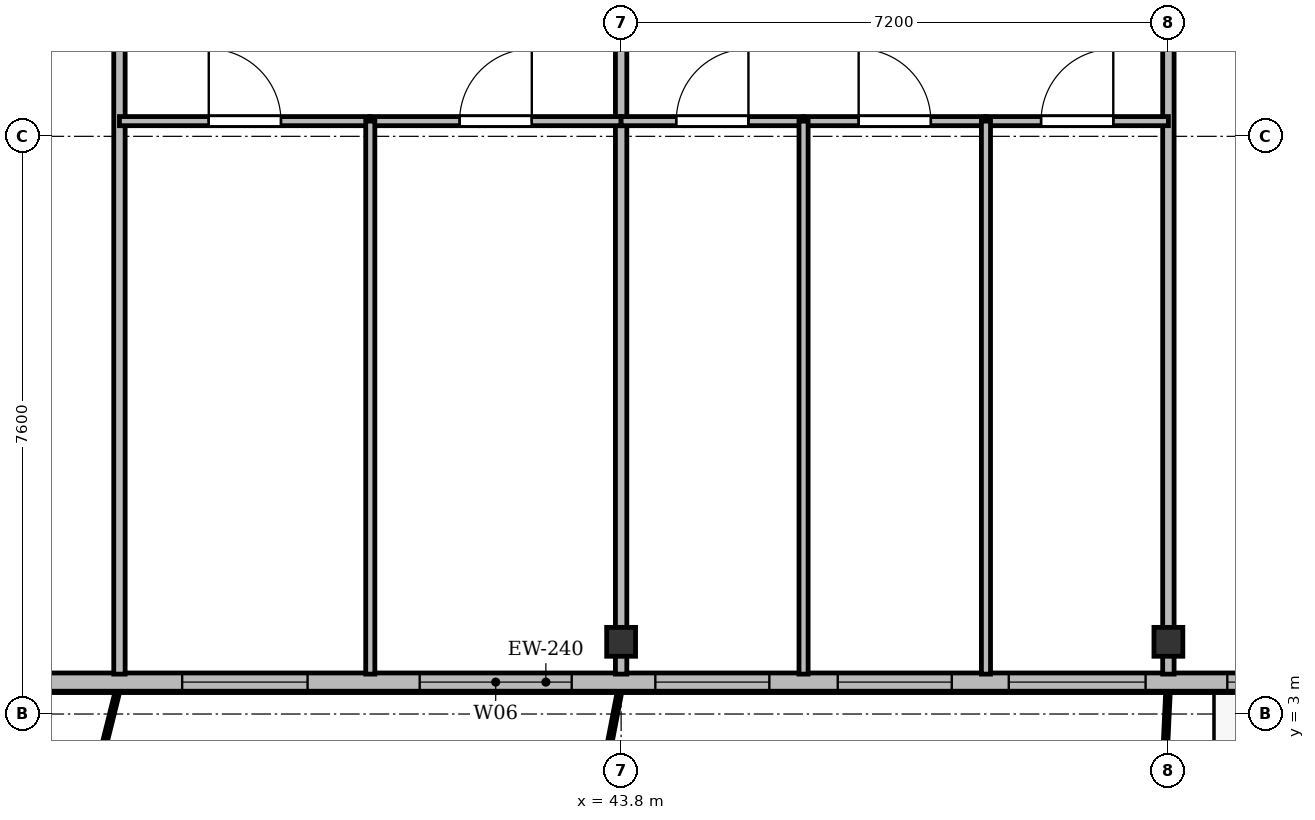
"""IFC4 building model, lengths in metres.
Left out: names, types, materials, properties, quantities, classifications, styles, units other than length and angle.
Written with IfcOpenShell. Run it as: python <this file> out.ifc"""

import sys

from ifc_helpers import new_model, si_unit, direction, frame, frame_2d, origin, origin_2d, place, context, subcontext, project, spatial, rectangle, i_section, extrude, source, transform, mapped, element, fill, save


model = new_model("IFC4")
c1 = context("Model", 3, precision=1e-05, world=origin(), true_north=direction((0.0, 1.0)))
c2 = subcontext(c1, "Body", "Model", "MODEL_VIEW")
j1 = project(units=[si_unit("LENGTHUNIT", "METRE"), si_unit("PLANEANGLEUNIT", "RADIAN")], contexts=[c1])
p1 = place(None, origin())
s1 = spatial("IfcSite", under=j1, at=p1, CompositionType="ELEMENT")
p2 = place(p1, origin())
s2 = spatial("IfcBuilding", under=s1, at=p2, CompositionType="ELEMENT")
p3 = place(p2, frame((0.0, 0.0, 135.7)))
s3 = spatial("IfcBuildingStorey", under=s2, at=p3, CompositionType="ELEMENT", Elevation=135.7)
m1 = source(origin(), c2, "Body", "SweptSolid", [
    extrude(i_section(OverallWidth=0.38, OverallDepth=0.38, WebThickness=0.02, FlangeThickness=0.03, at=origin_2d()), origin(), (0.0, 0.0, 1.0), 3.6),
])
for number, where, z_axis, x_axis in (
    (1, (43.8, 3.95, 0.0), (0.0, 0.0, 1.0), (1.0, 0.0, 0.0)),
    (2, (51.0, 3.95, 0.0), (0.0, 0.0, 1.0), (1.0, 0.0, 0.0)),
):
    element("IfcColumn", number, at=place(p3, frame(where, z_axis=z_axis, x_axis=x_axis)), inside=s3, PredefinedType="COLUMN", context=c2, shape_type="MappedRepresentation", body=[
        mapped(m1, transform((0.0, 0.0, 0.0), x_axis=(1.0, 0.0, 0.0), y_axis=(0.0, 1.0, 0.0), z_axis=(0.0, 0.0, 1.0), scale=1.0)),
    ])
p4 = place(p3, frame((63.6, 3.42, 0.0), z_axis=(0.0, 0.0, 1.0), x_axis=(-1.0, 0.0, 0.0)))
e3 = element("IfcWall", 3, at=p4, inside=s3, PredefinedType="SOLIDWALL", context=c2, shape_type="SweptSolid", body=[
    extrude(rectangle(XDim=52.8, YDim=0.24, at=frame_2d((26.4, 0.0))), origin(), (0.0, 0.0, 1.0), 3.35),
])
p5 = place(p4, frame((0.345, 0.0, 0.9)))
e4 = element("IfcOpeningElement", 4, at=p5, cuts=e3, PredefinedType="OPENING", context=c2, shape_type="SweptSolid", body=[
    extrude(rectangle(XDim=1.8, YDim=1.8, at=frame_2d((0.9, 0.9))), frame((0.0, 0.13, 0.0), z_axis=(0.0, -1.0, 0.0), x_axis=(1.0, 0.0, 0.0)), (0.0, 0.0, 1.0), 0.26),
])
p6 = place(p4, frame((2.9, 0.0, 0.9)))
e5 = element("IfcOpeningElement", 5, at=p6, cuts=e3, PredefinedType="OPENING", context=c2, shape_type="SweptSolid", body=[
    extrude(rectangle(XDim=1.5, YDim=1.75, at=frame_2d((0.75, 0.875))), frame((0.0, 0.13, 0.0), z_axis=(0.0, -1.0, 0.0), x_axis=(1.0, 0.0, 0.0)), (0.0, 0.0, 1.0), 0.26),
])
p7 = place(p4, frame((5.902, 0.0, 0.0)))
e6 = element("IfcOpeningElement", 6, at=p7, cuts=e3, PredefinedType="OPENING", context=c2, shape_type="SweptSolid", body=[
    extrude(rectangle(XDim=1.2, YDim=2.2, at=frame_2d((0.6, 1.1))), frame((0.0, 0.13, 0.0), z_axis=(0.0, -1.0, 0.0), x_axis=(1.0, 0.0, 0.0)), (0.0, 0.0, 1.0), 0.26),
])
p8 = place(p4, frame((7.65, 0.0, 0.9)))
e7 = element("IfcOpeningElement", 7, at=p8, cuts=e3, PredefinedType="OPENING", context=c2, shape_type="SweptSolid", body=[
    extrude(rectangle(XDim=1.5, YDim=1.75, at=frame_2d((0.75, 0.875))), frame((0.0, 0.13, 0.0), z_axis=(0.0, -1.0, 0.0), x_axis=(1.0, 0.0, 0.0)), (0.0, 0.0, 1.0), 0.26),
])
p9 = place(p4, frame((10.175, 0.0, 0.9)))
e8 = element("IfcOpeningElement", 8, at=p9, cuts=e3, PredefinedType="OPENING", context=c2, shape_type="SweptSolid", body=[
    extrude(rectangle(XDim=1.65, YDim=1.85, at=frame_2d((0.825, 0.925))), frame((0.0, 0.13, 0.0), z_axis=(0.0, -1.0, 0.0), x_axis=(1.0, 0.0, 0.0)), (0.0, 0.0, 1.0), 0.26),
])
p10 = place(p4, frame((12.9, 0.0, 0.9)))
e9 = element("IfcOpeningElement", 9, at=p10, cuts=e3, PredefinedType="OPENING", context=c2, shape_type="SweptSolid", body=[
    extrude(rectangle(XDim=1.8, YDim=1.8, at=frame_2d((0.9, 0.9))), frame((0.0, 0.13, 0.0), z_axis=(0.0, -1.0, 0.0), x_axis=(1.0, 0.0, 0.0)), (0.0, 0.0, 1.0), 0.26),
])
p11 = place(p4, frame((15.45, 0.0, 0.9)))
e10 = element("IfcOpeningElement", 10, at=p11, cuts=e3, PredefinedType="OPENING", context=c2, shape_type="SweptSolid", body=[
    extrude(rectangle(XDim=1.5, YDim=1.75, at=frame_2d((0.75, 0.875))), frame((0.0, 0.13, 0.0), z_axis=(0.0, -1.0, 0.0), x_axis=(1.0, 0.0, 0.0)), (0.0, 0.0, 1.0), 0.26),
])
p12 = place(p4, frame((17.85, 0.0, 0.9)))
e11 = element("IfcOpeningElement", 11, at=p12, cuts=e3, PredefinedType="OPENING", context=c2, shape_type="SweptSolid", body=[
    extrude(rectangle(XDim=1.5, YDim=1.75, at=frame_2d((0.75, 0.875))), frame((0.0, 0.13, 0.0), z_axis=(0.0, -1.0, 0.0), x_axis=(1.0, 0.0, 0.0)), (0.0, 0.0, 1.0), 0.26),
])
p13 = place(p4, frame((20.45, 0.0, 0.9)))
e12 = element("IfcOpeningElement", 12, at=p13, cuts=e3, PredefinedType="OPENING", context=c2, shape_type="SweptSolid", body=[
    extrude(rectangle(XDim=2.0, YDim=1.95, at=frame_2d((1.0, 0.975))), frame((0.0, 0.13, 0.0), z_axis=(0.0, -1.0, 0.0), x_axis=(1.0, 0.0, 0.0)), (0.0, 0.0, 1.0), 0.26),
])
p14 = place(p4, frame((23.925, 0.0, 0.9)))
e13 = element("IfcOpeningElement", 13, at=p14, cuts=e3, PredefinedType="OPENING", context=c2, shape_type="SweptSolid", body=[
    extrude(rectangle(XDim=1.65, YDim=1.85, at=frame_2d((0.825, 0.925))), frame((0.0, 0.13, 0.0), z_axis=(0.0, -1.0, 0.0), x_axis=(1.0, 0.0, 0.0)), (0.0, 0.0, 1.0), 0.26),
])
p15 = place(p4, frame((28.8, 0.0, 0.9)))
e14 = element("IfcOpeningElement", 14, at=p15, cuts=e3, PredefinedType="OPENING", context=c2, shape_type="SweptSolid", body=[
    extrude(rectangle(XDim=1.8, YDim=1.8, at=frame_2d((0.9, 0.9))), frame((0.0, 0.13, 0.0), z_axis=(0.0, -1.0, 0.0), x_axis=(1.0, 0.0, 0.0)), (0.0, 0.0, 1.0), 0.26),
])
p16 = place(p4, frame((34.478, 0.0, 0.0)))
e15 = element("IfcOpeningElement", 15, at=p16, cuts=e3, PredefinedType="OPENING", context=c2, shape_type="SweptSolid", body=[
    extrude(rectangle(XDim=1.2, YDim=2.2, at=frame_2d((0.6, 1.1))), frame((0.0, 0.13, 0.0), z_axis=(0.0, -1.0, 0.0), x_axis=(1.0, 0.0, 0.0)), (0.0, 0.0, 1.0), 0.26),
])
p17 = place(p4, frame((37.65, 0.0, 0.9)))
e16 = element("IfcOpeningElement", 16, at=p17, cuts=e3, PredefinedType="OPENING", context=c2, shape_type="SweptSolid", body=[
    extrude(rectangle(XDim=1.5, YDim=1.75, at=frame_2d((0.75, 0.875))), frame((0.0, 0.13, 0.0), z_axis=(0.0, -1.0, 0.0), x_axis=(1.0, 0.0, 0.0)), (0.0, 0.0, 1.0), 0.26),
])
p18 = place(p4, frame((40.8, 0.0, 0.9)))
e17 = element("IfcOpeningElement", 17, at=p18, cuts=e3, PredefinedType="OPENING", context=c2, shape_type="SweptSolid", body=[
    extrude(rectangle(XDim=2.0, YDim=1.95, at=frame_2d((1.0, 0.975))), frame((0.0, 0.13, 0.0), z_axis=(0.0, -1.0, 0.0), x_axis=(1.0, 0.0, 0.0)), (0.0, 0.0, 1.0), 0.26),
])
p19 = place(p4, frame((43.65, 0.0, 0.9)))
e18 = element("IfcOpeningElement", 18, at=p19, cuts=e3, PredefinedType="OPENING", context=c2, shape_type="SweptSolid", body=[
    extrude(rectangle(XDim=1.5, YDim=1.75, at=frame_2d((0.75, 0.875))), frame((0.0, 0.13, 0.0), z_axis=(0.0, -1.0, 0.0), x_axis=(1.0, 0.0, 0.0)), (0.0, 0.0, 1.0), 0.26),
])
p20 = place(p4, frame((45.7, 0.0, 0.9)))
e19 = element("IfcOpeningElement", 19, at=p20, cuts=e3, PredefinedType="OPENING", context=c2, shape_type="SweptSolid", body=[
    extrude(rectangle(XDim=1.8, YDim=1.8, at=frame_2d((0.9, 0.9))), frame((0.0, 0.13, 0.0), z_axis=(0.0, -1.0, 0.0), x_axis=(1.0, 0.0, 0.0)), (0.0, 0.0, 1.0), 0.26),
])
p21 = place(p4, frame((48.25, 0.0, 0.9)))
e20 = element("IfcOpeningElement", 20, at=p21, cuts=e3, PredefinedType="OPENING", context=c2, shape_type="SweptSolid", body=[
    extrude(rectangle(XDim=1.5, YDim=1.75, at=frame_2d((0.75, 0.875))), frame((0.0, 0.13, 0.0), z_axis=(0.0, -1.0, 0.0), x_axis=(1.0, 0.0, 0.0)), (0.0, 0.0, 1.0), 0.26),
])
p22 = place(p4, frame((50.705, 0.0, 0.9)))
e21 = element("IfcOpeningElement", 21, at=p22, cuts=e3, PredefinedType="OPENING", context=c2, shape_type="SweptSolid", body=[
    extrude(rectangle(XDim=1.5, YDim=1.75, at=frame_2d((0.75, 0.875))), frame((0.0, 0.13, 0.0), z_axis=(0.0, -1.0, 0.0), x_axis=(1.0, 0.0, 0.0)), (0.0, 0.0, 1.0), 0.26),
])
p23 = place(p3, frame((37.2, 3.525, 0.0), z_axis=(0.0, 0.0, 1.0), x_axis=(0.0, 1.0, 0.0)))
e22 = element("IfcWall", 22, at=p23, inside=s3, PredefinedType="PARTITIONING", context=c2, shape_type="SweptSolid", body=[
    extrude(rectangle(XDim=27.275, YDim=0.15, at=frame_2d((13.638, 0.0))), origin(), (0.0, 0.0, 1.0), 2.75),
])
for number, where, z_axis, x_axis in (
    (23, (43.8, 3.525, 0.0), (0.0, 0.0, 1.0), (0.0, 1.0, 0.0)),
    (24, (51.0, 3.525, 0.0), (0.0, 0.0, 1.0), (0.0, 1.0, 0.0)),
):
    element("IfcWall", number, at=place(p3, frame(where, z_axis=z_axis, x_axis=x_axis)), inside=s3, PredefinedType="PARTITIONING", context=c2, shape_type="SweptSolid", body=[
        extrude(rectangle(XDim=27.275, YDim=0.15, at=frame_2d((13.638, 0.0))), origin(), (0.0, 0.0, 1.0), 2.85),
    ])
p24 = place(p3, frame((37.2, 10.8, 0.0), z_axis=(0.0, 0.0, 1.0), x_axis=(1.0, 0.0, 0.0)))
e25 = element("IfcWall", 25, at=p24, inside=s3, PredefinedType="PARTITIONING", context=c2, shape_type="SweptSolid", body=[
    extrude(rectangle(XDim=3.3, YDim=0.12, at=frame_2d((1.65, 0.0))), origin(), (0.0, 0.0, 1.0), 3.0),
])
p25 = place(p24, frame((1.175, 0.0, 0.0)))
e26 = element("IfcOpeningElement", 26, at=p25, cuts=e25, PredefinedType="OPENING", context=c2, shape_type="SweptSolid", body=[
    extrude(rectangle(XDim=0.95, YDim=2.15, at=frame_2d((0.475, 1.075))), frame((0.0, 0.07, 0.0), z_axis=(0.0, -1.0, 0.0), x_axis=(1.0, 0.0, 0.0)), (0.0, 0.0, 1.0), 0.14),
])
p26 = place(p3, frame((40.5, 10.8, 0.0), z_axis=(0.0, 0.0, 1.0), x_axis=(1.0, 0.0, 0.0)))
e27 = element("IfcWall", 27, at=p26, inside=s3, PredefinedType="PARTITIONING", context=c2, shape_type="SweptSolid", body=[
    extrude(rectangle(XDim=3.3, YDim=0.12, at=frame_2d((1.65, 0.0))), origin(), (0.0, 0.0, 1.0), 2.85),
])
p27 = place(p26, frame((1.175, 0.0, 0.0)))
e28 = element("IfcOpeningElement", 28, at=p27, cuts=e27, PredefinedType="OPENING", context=c2, shape_type="SweptSolid", body=[
    extrude(rectangle(XDim=0.95, YDim=2.15, at=frame_2d((0.475, 1.075))), frame((0.0, 0.07, 0.0), z_axis=(0.0, -1.0, 0.0), x_axis=(1.0, 0.0, 0.0)), (0.0, 0.0, 1.0), 0.14),
])
p28 = place(p3, frame((40.5, 3.525, 0.0), z_axis=(0.0, 0.0, 1.0), x_axis=(0.0, 1.0, 0.0)))
e29 = element("IfcWall", 29, at=p28, inside=s3, PredefinedType="PARTITIONING", context=c2, shape_type="SweptSolid", body=[
    extrude(rectangle(XDim=7.275, YDim=0.12, at=frame_2d((3.638, 0.0))), origin(), (0.0, 0.0, 1.0), 2.75),
])
p29 = place(p3, frame((43.8, 10.8, 0.0), z_axis=(0.0, 0.0, 1.0), x_axis=(1.0, 0.0, 0.0)))
e30 = element("IfcWall", 30, at=p29, inside=s3, PredefinedType="PARTITIONING", context=c2, shape_type="SweptSolid", body=[
    extrude(rectangle(XDim=2.4, YDim=0.12, at=frame_2d((1.2, 0.0))), origin(), (0.0, 0.0, 1.0), 2.85),
])
p30 = place(p29, frame((0.725, 0.0, 0.0)))
e31 = element("IfcOpeningElement", 31, at=p30, cuts=e30, PredefinedType="OPENING", context=c2, shape_type="SweptSolid", body=[
    extrude(rectangle(XDim=0.95, YDim=2.15, at=frame_2d((0.475, 1.075))), frame((0.0, 0.07, 0.0), z_axis=(0.0, -1.0, 0.0), x_axis=(1.0, 0.0, 0.0)), (0.0, 0.0, 1.0), 0.14),
])
p31 = place(p3, frame((46.2, 10.8, 0.0), z_axis=(0.0, 0.0, 1.0), x_axis=(1.0, 0.0, 0.0)))
e32 = element("IfcWall", 32, at=p31, inside=s3, PredefinedType="PARTITIONING", context=c2, shape_type="SweptSolid", body=[
    extrude(rectangle(XDim=2.4, YDim=0.12, at=frame_2d((1.2, 0.0))), origin(), (0.0, 0.0, 1.0), 3.0),
])
p32 = place(p31, frame((0.725, 0.0, 0.0)))
e33 = element("IfcOpeningElement", 33, at=p32, cuts=e32, PredefinedType="OPENING", context=c2, shape_type="SweptSolid", body=[
    extrude(rectangle(XDim=0.95, YDim=2.15, at=frame_2d((0.475, 1.075))), frame((0.0, 0.07, 0.0), z_axis=(0.0, -1.0, 0.0), x_axis=(1.0, 0.0, 0.0)), (0.0, 0.0, 1.0), 0.14),
])
p33 = place(p3, frame((46.2, 3.525, 0.0), z_axis=(0.0, 0.0, 1.0), x_axis=(0.0, 1.0, 0.0)))
e34 = element("IfcWall", 34, at=p33, inside=s3, PredefinedType="PARTITIONING", context=c2, shape_type="SweptSolid", body=[
    extrude(rectangle(XDim=7.275, YDim=0.12, at=frame_2d((3.638, 0.0))), origin(), (0.0, 0.0, 1.0), 2.75),
])
p34 = place(p3, frame((48.6, 10.8, 0.0), z_axis=(0.0, 0.0, 1.0), x_axis=(1.0, 0.0, 0.0)))
e35 = element("IfcWall", 35, at=p34, inside=s3, PredefinedType="PARTITIONING", context=c2, shape_type="SweptSolid", body=[
    extrude(rectangle(XDim=2.4, YDim=0.12, at=frame_2d((1.2, 0.0))), origin(), (0.0, 0.0, 1.0), 2.85),
])
p35 = place(p34, frame((0.725, 0.0, 0.0)))
e36 = element("IfcOpeningElement", 36, at=p35, cuts=e35, PredefinedType="OPENING", context=c2, shape_type="SweptSolid", body=[
    extrude(rectangle(XDim=0.95, YDim=2.15, at=frame_2d((0.475, 1.075))), frame((0.0, 0.07, 0.0), z_axis=(0.0, -1.0, 0.0), x_axis=(1.0, 0.0, 0.0)), (0.0, 0.0, 1.0), 0.14),
])
p36 = place(p3, frame((48.6, 3.525, 0.0), z_axis=(0.0, 0.0, 1.0), x_axis=(0.0, 1.0, 0.0)))
e37 = element("IfcWall", 37, at=p36, inside=s3, PredefinedType="PARTITIONING", context=c2, shape_type="SweptSolid", body=[
    extrude(rectangle(XDim=7.275, YDim=0.12, at=frame_2d((3.638, 0.0))), origin(), (0.0, 0.0, 1.0), 2.75),
])
m2 = source(origin(), c2, "Body", "SweptSolid", [
    extrude(rectangle(XDim=1.65, YDim=1.85, at=frame_2d((0.825, 0.925))), frame((0.0, 0.03, 0.0), z_axis=(0.0, -1.0, 0.0), x_axis=(1.0, 0.0, 0.0)), (0.0, 0.0, 1.0), 0.06),
])
p37 = place(p9, origin())
e38 = element("IfcWindow", 38, at=p37, inside=s3, PartitioningType="SINGLE_PANEL", PredefinedType="WINDOW", context=c2, shape_type="MappedRepresentation", body=[
    mapped(m2, transform((0.0, 0.0, 0.0), x_axis=(1.0, 0.0, 0.0), y_axis=(0.0, 1.0, 0.0), z_axis=(0.0, 0.0, 1.0), scale=1.0)),
])
fill(e8, e38)
m3 = source(origin(), c2, "Body", "SweptSolid", [
    extrude(rectangle(XDim=1.8, YDim=1.8, at=frame_2d((0.9, 0.9))), frame((0.0, 0.03, 0.0), z_axis=(0.0, -1.0, 0.0), x_axis=(1.0, 0.0, 0.0)), (0.0, 0.0, 1.0), 0.06),
])
p38 = place(p10, origin())
e39 = element("IfcWindow", 39, at=p38, inside=s3, PartitioningType="SINGLE_PANEL", PredefinedType="WINDOW", context=c2, shape_type="MappedRepresentation", body=[
    mapped(m3, transform((0.0, 0.0, 0.0), x_axis=(1.0, 0.0, 0.0), y_axis=(0.0, 1.0, 0.0), z_axis=(0.0, 0.0, 1.0), scale=1.0)),
])
fill(e9, e39)
m4 = source(origin(), c2, "Body", "SweptSolid", [
    extrude(rectangle(XDim=1.5, YDim=1.75, at=frame_2d((0.75, 0.875))), frame((0.0, 0.03, 0.0), z_axis=(0.0, -1.0, 0.0), x_axis=(1.0, 0.0, 0.0)), (0.0, 0.0, 1.0), 0.06),
])
p39 = place(p11, origin())
e40 = element("IfcWindow", 40, at=p39, inside=s3, PartitioningType="SINGLE_PANEL", PredefinedType="WINDOW", context=c2, shape_type="MappedRepresentation", body=[
    mapped(m4, transform((0.0, 0.0, 0.0), x_axis=(1.0, 0.0, 0.0), y_axis=(0.0, 1.0, 0.0), z_axis=(0.0, 0.0, 1.0), scale=1.0)),
])
fill(e10, e40)
p40 = place(p12, origin())
e41 = element("IfcWindow", 41, at=p40, inside=s3, PartitioningType="SINGLE_PANEL", PredefinedType="WINDOW", context=c2, shape_type="MappedRepresentation", body=[
    mapped(m4, transform((0.0, 0.0, 0.0), x_axis=(1.0, 0.0, 0.0), y_axis=(0.0, 1.0, 0.0), z_axis=(0.0, 0.0, 1.0), scale=1.0)),
])
fill(e11, e41)
m5 = source(origin(), c2, "Body", "SweptSolid", [
    extrude(rectangle(XDim=2.0, YDim=1.95, at=frame_2d((1.0, 0.975))), frame((0.0, 0.03, 0.0), z_axis=(0.0, -1.0, 0.0), x_axis=(1.0, 0.0, 0.0)), (0.0, 0.0, 1.0), 0.06),
])
p41 = place(p13, origin())
e42 = element("IfcWindow", 42, at=p41, inside=s3, PartitioningType="SINGLE_PANEL", PredefinedType="WINDOW", context=c2, shape_type="MappedRepresentation", body=[
    mapped(m5, transform((0.0, 0.0, 0.0), x_axis=(1.0, 0.0, 0.0), y_axis=(0.0, 1.0, 0.0), z_axis=(0.0, 0.0, 1.0), scale=1.0)),
])
fill(e12, e42)
p42 = place(p14, origin())
e43 = element("IfcWindow", 43, at=p42, inside=s3, PartitioningType="SINGLE_PANEL", PredefinedType="WINDOW", context=c2, shape_type="MappedRepresentation", body=[
    mapped(m2, transform((0.0, 0.0, 0.0), x_axis=(1.0, 0.0, 0.0), y_axis=(0.0, 1.0, 0.0), z_axis=(0.0, 0.0, 1.0), scale=1.0)),
])
fill(e13, e43)
m6 = source(origin(), c2, "Body", "SweptSolid", [
    extrude(rectangle(XDim=0.95, YDim=2.15, at=frame_2d((0.475, 1.075))), frame((0.0, 0.025, 0.0), z_axis=(0.0, -1.0, 0.0), x_axis=(1.0, 0.0, 0.0)), (0.0, 0.0, 1.0), 0.05),
])
p43 = place(p25, origin())
e44 = element("IfcDoor", 44, at=p43, inside=s3, OperationType="SINGLE_SWING_LEFT", PredefinedType="DOOR", context=c2, shape_type="MappedRepresentation", body=[
    mapped(m6, transform((0.0, 0.0, 0.0), x_axis=(1.0, 0.0, 0.0), y_axis=(0.0, 1.0, 0.0), z_axis=(0.0, 0.0, 1.0), scale=1.0)),
])
fill(e26, e44)
p44 = place(p27, origin())
e45 = element("IfcDoor", 45, at=p44, inside=s3, OperationType="SINGLE_SWING_RIGHT", PredefinedType="DOOR", context=c2, shape_type="MappedRepresentation", body=[
    mapped(m6, transform((0.0, 0.0, 0.0), x_axis=(1.0, 0.0, 0.0), y_axis=(0.0, 1.0, 0.0), z_axis=(0.0, 0.0, 1.0), scale=1.0)),
])
fill(e28, e45)
p45 = place(p30, origin())
e46 = element("IfcDoor", 46, at=p45, inside=s3, OperationType="SINGLE_SWING_RIGHT", PredefinedType="DOOR", context=c2, shape_type="MappedRepresentation", body=[
    mapped(m6, transform((0.0, 0.0, 0.0), x_axis=(1.0, 0.0, 0.0), y_axis=(0.0, 1.0, 0.0), z_axis=(0.0, 0.0, 1.0), scale=1.0)),
])
fill(e31, e46)
p46 = place(p32, origin())
e47 = element("IfcDoor", 47, at=p46, inside=s3, OperationType="SINGLE_SWING_LEFT", PredefinedType="DOOR", context=c2, shape_type="MappedRepresentation", body=[
    mapped(m6, transform((0.0, 0.0, 0.0), x_axis=(1.0, 0.0, 0.0), y_axis=(0.0, 1.0, 0.0), z_axis=(0.0, 0.0, 1.0), scale=1.0)),
])
fill(e33, e47)
p47 = place(p35, origin())
e48 = element("IfcDoor", 48, at=p47, inside=s3, OperationType="SINGLE_SWING_RIGHT", PredefinedType="DOOR", context=c2, shape_type="MappedRepresentation", body=[
    mapped(m6, transform((0.0, 0.0, 0.0), x_axis=(1.0, 0.0, 0.0), y_axis=(0.0, 1.0, 0.0), z_axis=(0.0, 0.0, 1.0), scale=1.0)),
])
fill(e36, e48)
save(model, sys.argv[1])
